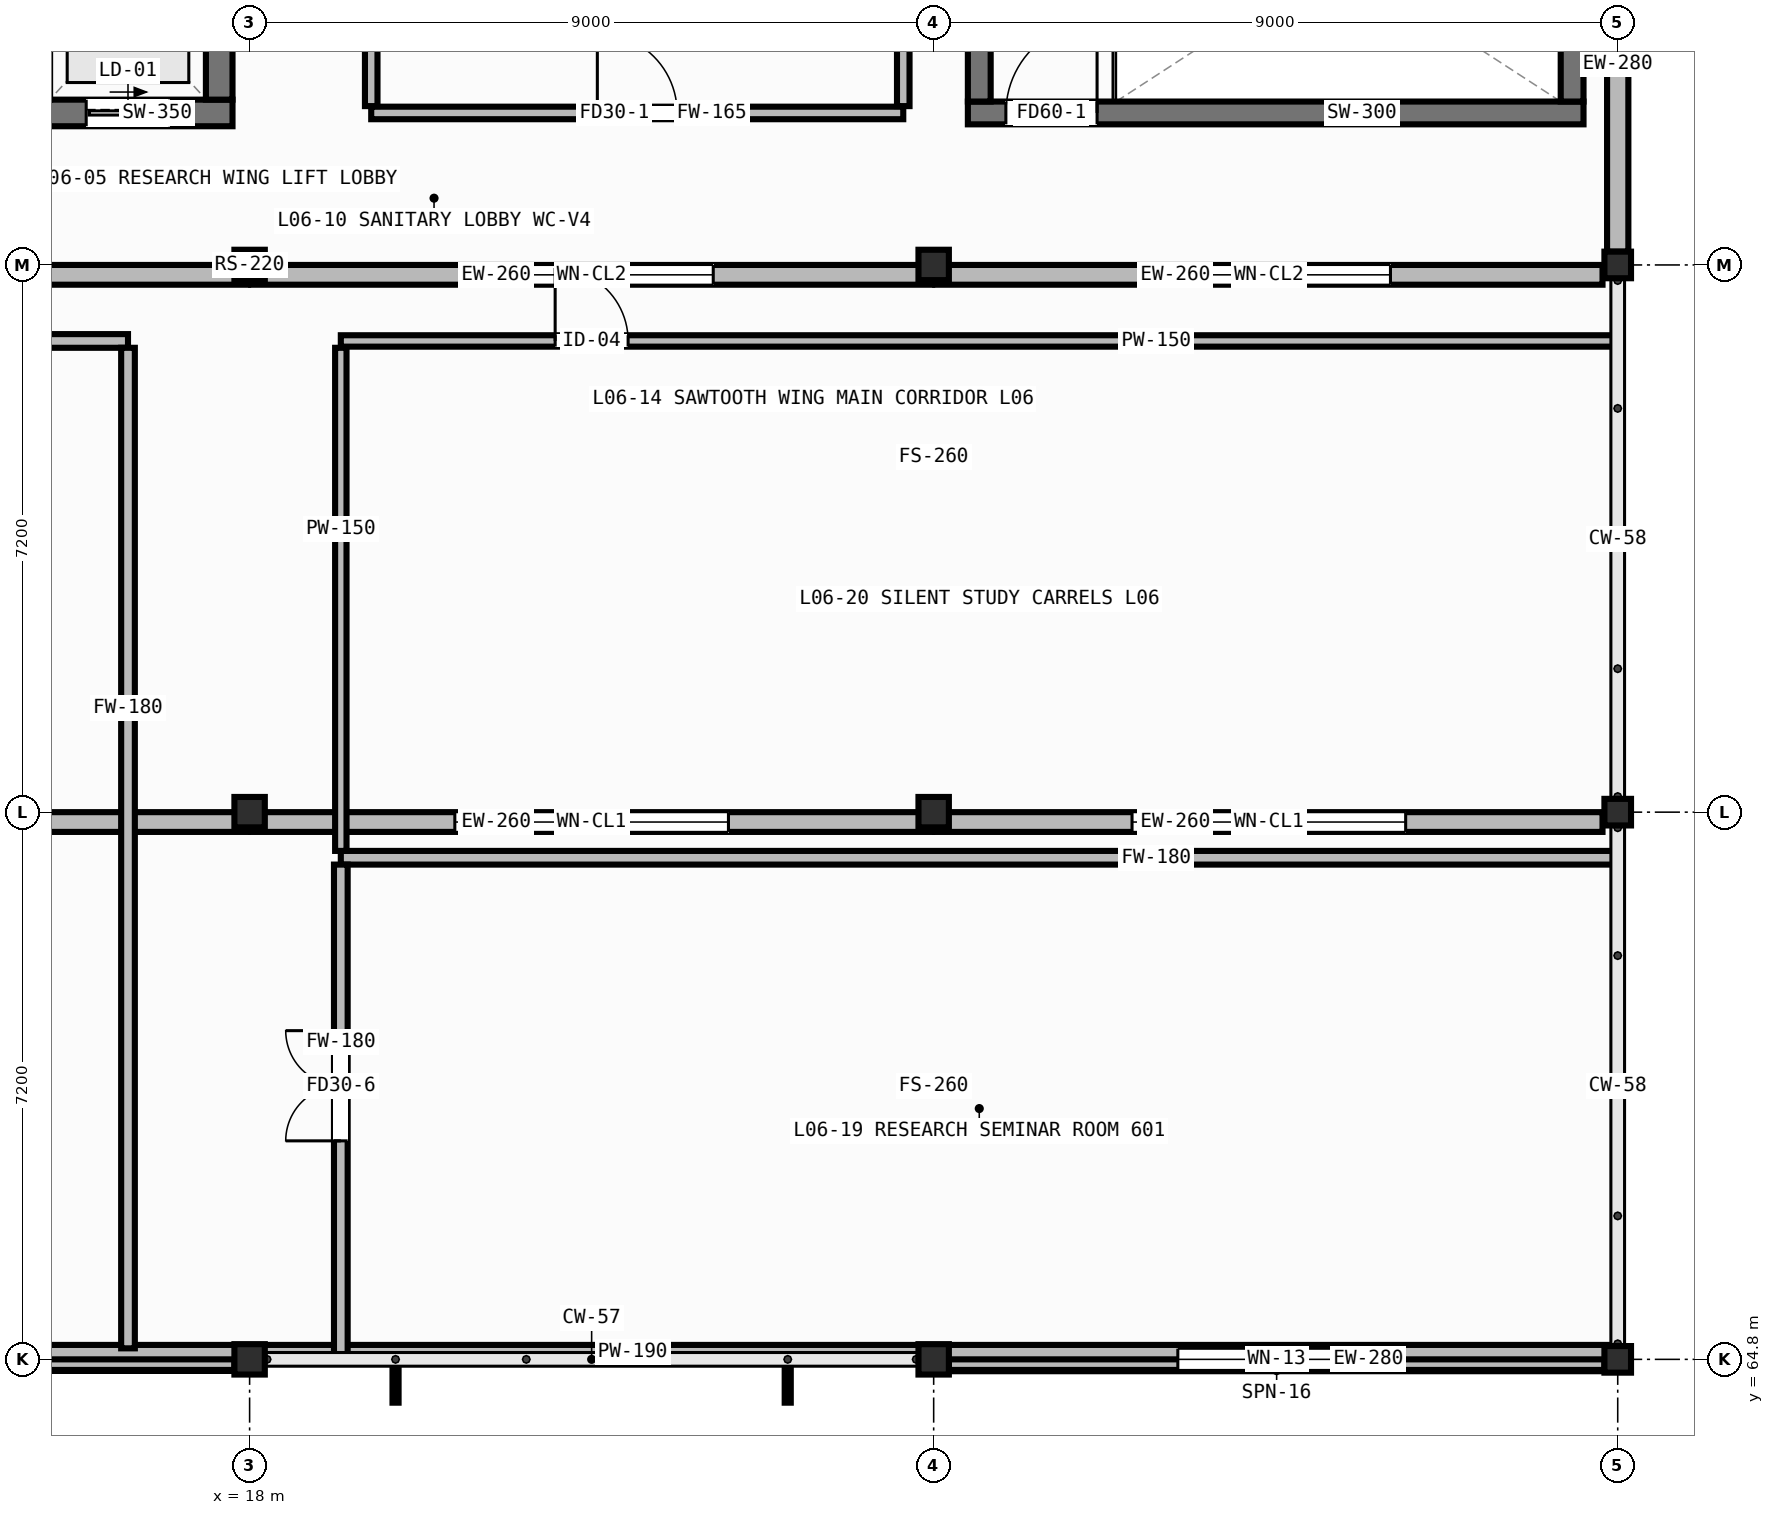
"""IFC4 building model, lengths in metres.
Left out: names, types, materials, properties, quantities, classifications, styles, units other than length and angle.
Written with IfcOpenShell. Run it as: python <this file> out.ifc"""

import sys

from ifc_helpers import new_model, si_unit, direction, frame, frame_2d, origin, origin_2d, place, context, subcontext, project, spatial, rectangle, hollow_rectangle, extrude, element, fill, save


model = new_model("IFC4")
c1 = context("Model", 3, precision=1e-05, world=origin(), true_north=direction((0.0, 1.0)))
c2 = subcontext(c1, "Body", "Model", "MODEL_VIEW")
j1 = project(units=[si_unit("LENGTHUNIT", "METRE"), si_unit("PLANEANGLEUNIT", "RADIAN")], contexts=[c1])
p1 = place(None, origin())
s1 = spatial("IfcSite", under=j1, at=p1, CompositionType="ELEMENT")
p2 = place(p1, origin())
s2 = spatial("IfcBuilding", under=s1, at=p2, CompositionType="ELEMENT")
p3 = place(p2, frame((0.0, 0.0, 20.6)))
s3 = spatial("IfcBuildingStorey", under=s2, at=p3, CompositionType="ELEMENT", Elevation=20.6)
for number, where, z_axis, x_axis in (
    (1, (18.0, 64.8, 0.0), (0.0, 0.0, 1.0), (1.0, 0.0, 0.0)),
    (2, (18.0, 72.0, 0.0), (0.0, 0.0, 1.0), (1.0, 0.0, 0.0)),
    (3, (18.0, 79.2, 0.0), (0.0, 0.0, 1.0), (1.0, 0.0, 0.0)),
    (4, (27.0, 64.8, 0.0), (0.0, 0.0, 1.0), (1.0, 0.0, 0.0)),
    (5, (27.0, 72.0, 0.0), (0.0, 0.0, 1.0), (1.0, 0.0, 0.0)),
    (6, (27.0, 79.2, 0.0), (0.0, 0.0, 1.0), (1.0, 0.0, 0.0)),
):
    element("IfcColumn", number, at=place(p3, frame(where, z_axis=z_axis, x_axis=x_axis)), inside=s3, PredefinedType="COLUMN", context=c2, shape_type="SweptSolid", body=[
        extrude(hollow_rectangle(XDim=0.4, YDim=0.4, WallThickness=0.016, at=origin_2d()), origin(), (0.0, 0.0, 1.0), 3.18),
    ])
for number, where, z_axis, x_axis in (
    (7, (36.0, 64.8, 0.0), (0.0, 0.0, 1.0), (1.0, 0.0, 0.0)),
    (8, (36.0, 72.0, 0.0), (0.0, 0.0, 1.0), (1.0, 0.0, 0.0)),
    (9, (36.0, 79.2, 0.0), (0.0, 0.0, 1.0), (1.0, 0.0, 0.0)),
):
    element("IfcColumn", number, at=place(p3, frame(where, z_axis=z_axis, x_axis=x_axis)), inside=s3, PredefinedType="COLUMN", context=c2, shape_type="SweptSolid", body=[
        extrude(hollow_rectangle(XDim=0.35, YDim=0.35, WallThickness=0.012, at=origin_2d()), origin(), (0.0, 0.0, 1.0), 3.18),
    ])
p4 = place(p3, frame((9.2, 64.8, 0.0), z_axis=(0.0, 0.0, 1.0), x_axis=(1.0, 0.0, 0.0)))
e10 = element("IfcWall", 10, at=p4, inside=s3, PredefinedType="STANDARD", context=c2, shape_type="SweptSolid", body=[
    extrude(rectangle(XDim=8.6, YDim=0.28, at=frame_2d((4.3, 0.0))), origin(), (0.0, 0.0, 1.0), 2.78),
])
p5 = place(p4, frame((3.0, 0.0, 0.85)))
e11 = element("IfcOpeningElement", 11, at=p5, cuts=e10, PredefinedType="OPENING", context=c2, shape_type="SweptSolid", body=[
    extrude(rectangle(XDim=2.6, YDim=1.6, at=frame_2d((1.3, 0.8))), frame((0.0, 0.152, 0.0), z_axis=(0.0, -1.0, 0.0), x_axis=(1.0, 0.0, 0.0)), (0.0, 0.0, 1.0), 0.304),
])
p6 = place(p3, frame((27.2, 64.8, 0.0), z_axis=(0.0, 0.0, 1.0), x_axis=(1.0, 0.0, 0.0)))
e12 = element("IfcWall", 12, at=p6, inside=s3, PredefinedType="STANDARD", context=c2, shape_type="SweptSolid", body=[
    extrude(rectangle(XDim=8.625, YDim=0.28, at=frame_2d((4.312, 0.0))), origin(), (0.0, 0.0, 1.0), 2.78),
])
p7 = place(p6, frame((3.012, 0.0, 0.85)))
e13 = element("IfcOpeningElement", 13, at=p7, cuts=e12, PredefinedType="OPENING", context=c2, shape_type="SweptSolid", body=[
    extrude(rectangle(XDim=2.6, YDim=1.6, at=frame_2d((1.3, 0.8))), frame((0.0, 0.152, 0.0), z_axis=(0.0, -1.0, 0.0), x_axis=(1.0, 0.0, 0.0)), (0.0, 0.0, 1.0), 0.304),
])
p8 = place(p3, frame((36.0, 86.225, 0.0), z_axis=(0.0, 0.0, 1.0), x_axis=(0.0, -1.0, 0.0)))
e14 = element("IfcWall", 14, at=p8, inside=s3, PredefinedType="STANDARD", context=c2, shape_type="SweptSolid", body=[
    extrude(rectangle(XDim=6.85, YDim=0.28, at=frame_2d((3.425, 0.0))), origin(), (0.0, 0.0, 1.0), 2.78),
])
p9 = place(p3, frame((17.98, 71.87, 3.4), z_axis=(0.0, 0.0, 1.0), x_axis=(-1.0, 0.0, 0.0)))
e15 = element("IfcWall", 15, at=p9, inside=s3, PredefinedType="STANDARD", context=c2, shape_type="SweptSolid", body=[
    extrude(rectangle(XDim=8.96, YDim=0.26, at=frame_2d((4.48, 0.0))), origin(), (0.0, 0.0, 1.0), 2.05),
])
p10 = place(p9, frame((2.68, 0.0, 0.38)))
e16 = element("IfcOpeningElement", 16, at=p10, cuts=e15, PredefinedType="OPENING", context=c2, shape_type="SweptSolid", body=[
    extrude(rectangle(XDim=3.6, YDim=1.2, at=frame_2d((1.8, 0.6))), frame((0.0, 0.142, 0.0), z_axis=(0.0, -1.0, 0.0), x_axis=(1.0, 0.0, 0.0)), (0.0, 0.0, 1.0), 0.284),
])
p11 = place(p3, frame((26.98, 71.87, 3.4), z_axis=(0.0, 0.0, 1.0), x_axis=(-1.0, 0.0, 0.0)))
e17 = element("IfcWall", 17, at=p11, inside=s3, PredefinedType="STANDARD", context=c2, shape_type="SweptSolid", body=[
    extrude(rectangle(XDim=8.96, YDim=0.26, at=frame_2d((4.48, 0.0))), origin(), (0.0, 0.0, 1.0), 2.05),
])
p12 = place(p11, frame((2.68, 0.0, 0.38)))
e18 = element("IfcOpeningElement", 18, at=p12, cuts=e17, PredefinedType="OPENING", context=c2, shape_type="SweptSolid", body=[
    extrude(rectangle(XDim=3.6, YDim=1.2, at=frame_2d((1.8, 0.6))), frame((0.0, 0.142, 0.0), z_axis=(0.0, -1.0, 0.0), x_axis=(1.0, 0.0, 0.0)), (0.0, 0.0, 1.0), 0.284),
])
p13 = place(p3, frame((35.8, 71.87, 3.4), z_axis=(0.0, 0.0, 1.0), x_axis=(-1.0, 0.0, 0.0)))
e19 = element("IfcWall", 19, at=p13, inside=s3, PredefinedType="STANDARD", context=c2, shape_type="SweptSolid", body=[
    extrude(rectangle(XDim=8.78, YDim=0.26, at=frame_2d((4.39, 0.0))), origin(), (0.0, 0.0, 1.0), 2.05),
])
p14 = place(p13, frame((2.59, 0.0, 0.38)))
e20 = element("IfcOpeningElement", 20, at=p14, cuts=e19, PredefinedType="OPENING", context=c2, shape_type="SweptSolid", body=[
    extrude(rectangle(XDim=3.6, YDim=1.2, at=frame_2d((1.8, 0.6))), frame((0.0, 0.142, 0.0), z_axis=(0.0, -1.0, 0.0), x_axis=(1.0, 0.0, 0.0)), (0.0, 0.0, 1.0), 0.284),
])
p15 = place(p3, frame((17.98, 79.07, 3.4), z_axis=(0.0, 0.0, 1.0), x_axis=(-1.0, 0.0, 0.0)))
e21 = element("IfcWall", 21, at=p15, inside=s3, PredefinedType="STANDARD", context=c2, shape_type="SweptSolid", body=[
    extrude(rectangle(XDim=8.96, YDim=0.26, at=frame_2d((4.48, 0.0))), origin(), (0.0, 0.0, 1.0), 2.05),
])
p16 = place(p15, frame((2.88, 0.0, 0.38)))
e22 = element("IfcOpeningElement", 22, at=p16, cuts=e21, PredefinedType="OPENING", context=c2, shape_type="SweptSolid", body=[
    extrude(rectangle(XDim=3.2, YDim=1.1, at=frame_2d((1.6, 0.55))), frame((0.0, 0.142, 0.0), z_axis=(0.0, -1.0, 0.0), x_axis=(1.0, 0.0, 0.0)), (0.0, 0.0, 1.0), 0.284),
])
p17 = place(p3, frame((26.98, 79.07, 3.4), z_axis=(0.0, 0.0, 1.0), x_axis=(-1.0, 0.0, 0.0)))
e23 = element("IfcWall", 23, at=p17, inside=s3, PredefinedType="STANDARD", context=c2, shape_type="SweptSolid", body=[
    extrude(rectangle(XDim=8.96, YDim=0.26, at=frame_2d((4.48, 0.0))), origin(), (0.0, 0.0, 1.0), 2.05),
])
p18 = place(p17, frame((2.88, 0.0, 0.38)))
e24 = element("IfcOpeningElement", 24, at=p18, cuts=e23, PredefinedType="OPENING", context=c2, shape_type="SweptSolid", body=[
    extrude(rectangle(XDim=3.2, YDim=1.1, at=frame_2d((1.6, 0.55))), frame((0.0, 0.142, 0.0), z_axis=(0.0, -1.0, 0.0), x_axis=(1.0, 0.0, 0.0)), (0.0, 0.0, 1.0), 0.284),
])
p19 = place(p3, frame((35.8, 79.07, 3.4), z_axis=(0.0, 0.0, 1.0), x_axis=(-1.0, 0.0, 0.0)))
e25 = element("IfcWall", 25, at=p19, inside=s3, PredefinedType="STANDARD", context=c2, shape_type="SweptSolid", body=[
    extrude(rectangle(XDim=8.78, YDim=0.26, at=frame_2d((4.39, 0.0))), origin(), (0.0, 0.0, 1.0), 2.05),
])
p20 = place(p19, frame((2.79, 0.0, 0.38)))
e26 = element("IfcOpeningElement", 26, at=p20, cuts=e25, PredefinedType="OPENING", context=c2, shape_type="SweptSolid", body=[
    extrude(rectangle(XDim=3.2, YDim=1.1, at=frame_2d((1.6, 0.55))), frame((0.0, 0.142, 0.0), z_axis=(0.0, -1.0, 0.0), x_axis=(1.0, 0.0, 0.0)), (0.0, 0.0, 1.0), 0.284),
])
p21 = place(p3, frame((0.0, 64.895, 3.4), z_axis=(0.0, 0.0, 1.0), x_axis=(1.0, 0.0, 0.0)))
e27 = element("IfcWall", 27, at=p21, inside=s3, PredefinedType="PARAPET", context=c2, shape_type="SweptSolid", body=[
    extrude(rectangle(XDim=36.0, YDim=0.19, at=frame_2d((18.0, 0.0))), origin(), (0.0, 0.0, 1.0), 0.75),
])
p22 = place(p3, frame((27.45, 81.2, 0.0), z_axis=(0.0, 0.0, 1.0), x_axis=(1.0, 0.0, 0.0)))
e28 = element("IfcWall", 28, at=p22, inside=s3, PredefinedType="SHEAR", context=c2, shape_type="SweptSolid", body=[
    extrude(rectangle(XDim=8.1, YDim=0.3, at=frame_2d((4.05, 0.0))), origin(), (0.0, 0.0, 1.0), 3.18),
])
p23 = place(p22, frame((0.5, 0.0, 0.0)))
e29 = element("IfcOpeningElement", 29, at=p23, cuts=e28, PredefinedType="OPENING", context=c2, shape_type="SweptSolid", body=[
    extrude(rectangle(XDim=1.2, YDim=2.1, at=frame_2d((0.6, 1.05))), frame((0.0, 0.162, 0.0), z_axis=(0.0, -1.0, 0.0), x_axis=(1.0, 0.0, 0.0)), (0.0, 0.0, 1.0), 0.324),
])
for number, where, z_axis, x_axis in (
    (30, (27.6, 81.35, 0.0), (0.0, 0.0, 1.0), (0.0, 1.0, 0.0)),
    (31, (35.4, 81.35, 0.0), (0.0, 0.0, 1.0), (0.0, 1.0, 0.0)),
):
    element("IfcWall", number, at=place(p3, frame(where, z_axis=z_axis, x_axis=x_axis)), inside=s3, PredefinedType="SHEAR", context=c2, shape_type="SweptSolid", body=[
        extrude(rectangle(XDim=3.8, YDim=0.3, at=frame_2d((1.9, 0.0))), origin(), (0.0, 0.0, 1.0), 3.18),
    ])
p24 = place(p3, frame((15.025, 81.2, 0.0), z_axis=(0.0, 0.0, 1.0), x_axis=(1.0, 0.0, 0.0)))
e32 = element("IfcWall", 32, at=p24, inside=s3, PredefinedType="SHEAR", context=c2, shape_type="SweptSolid", body=[
    extrude(rectangle(XDim=2.75, YDim=0.35, at=frame_2d((1.375, 0.0))), origin(), (0.0, 0.0, 1.0), 3.18),
])
p25 = place(p24, frame((0.825, 0.0, 0.0)))
e33 = element("IfcOpeningElement", 33, at=p25, cuts=e32, PredefinedType="OPENING", context=c2, shape_type="SweptSolid", body=[
    extrude(rectangle(XDim=1.1, YDim=2.1, at=frame_2d((0.55, 1.05))), frame((0.0, 0.187, 0.0), z_axis=(0.0, -1.0, 0.0), x_axis=(1.0, 0.0, 0.0)), (0.0, 0.0, 1.0), 0.374),
])
p26 = place(p3, frame((17.6, 81.375, 0.0), z_axis=(0.0, 0.0, 1.0), x_axis=(0.0, 1.0, 0.0)))
e34 = element("IfcWall", 34, at=p26, inside=s3, PredefinedType="SHEAR", context=c2, shape_type="SweptSolid", body=[
    extrude(rectangle(XDim=2.25, YDim=0.35, at=frame_2d((1.125, 0.0))), origin(), (0.0, 0.0, 1.0), 3.18),
])
p27 = place(p3, frame((19.6, 81.2, 0.0), z_axis=(0.0, 0.0, 1.0), x_axis=(1.0, 0.0, 0.0)))
e35 = element("IfcWall", 35, at=p27, inside=s3, PredefinedType="PARTITIONING", context=c2, shape_type="SweptSolid", body=[
    extrude(rectangle(XDim=7.0, YDim=0.165, at=frame_2d((3.5, 0.0))), origin(), (0.0, 0.0, 1.0), 3.18),
])
p28 = place(p27, frame((2.975, 0.0, 0.0)))
e36 = element("IfcOpeningElement", 36, at=p28, cuts=e35, PredefinedType="OPENING", context=c2, shape_type="SweptSolid", body=[
    extrude(rectangle(XDim=1.05, YDim=2.1, at=frame_2d((0.525, 1.05))), frame((0.0, 0.094, 0.0), z_axis=(0.0, -1.0, 0.0), x_axis=(1.0, 0.0, 0.0)), (0.0, 0.0, 1.0), 0.189),
])
for number, where, z_axis, x_axis in (
    (37, (19.6, 81.29, 0.0), (0.0, 0.0, 1.0), (0.0, 1.0, 0.0)),
    (38, (26.6, 81.29, 0.0), (0.0, 0.0, 1.0), (0.0, 1.0, 0.0)),
):
    element("IfcWall", number, at=place(p3, frame(where, z_axis=z_axis, x_axis=x_axis)), inside=s3, PredefinedType="PARTITIONING", context=c2, shape_type="SweptSolid", body=[
        extrude(rectangle(XDim=2.22, YDim=0.165, at=frame_2d((1.11, 0.0))), origin(), (0.0, 0.0, 1.0), 3.18),
    ])
p29 = place(p3, frame((0.035, 78.2, 0.0), z_axis=(0.0, 0.0, 1.0), x_axis=(1.0, 0.0, 0.0)))
e39 = element("IfcWall", 39, at=p29, inside=s3, PredefinedType="PARTITIONING", context=c2, shape_type="SweptSolid", body=[
    extrude(rectangle(XDim=16.365, YDim=0.18, at=frame_2d((8.183, 0.0))), origin(), (0.0, 0.0, 1.0), 3.18),
])
p30 = place(p29, frame((3.815, 0.0, 0.0)))
e40 = element("IfcOpeningElement", 40, at=p30, cuts=e39, PredefinedType="OPENING", context=c2, shape_type="SweptSolid", body=[
    extrude(rectangle(XDim=1.3, YDim=2.08, at=frame_2d((0.65, 1.04))), frame((0.0, 0.102, 0.0), z_axis=(0.0, -1.0, 0.0), x_axis=(1.0, 0.0, 0.0)), (0.0, 0.0, 1.0), 0.204),
])
p31 = place(p3, frame((16.4, 64.945, 0.0), z_axis=(0.0, 0.0, 1.0), x_axis=(0.0, 1.0, 0.0)))
e41 = element("IfcWall", 41, at=p31, inside=s3, PredefinedType="PARTITIONING", context=c2, shape_type="SweptSolid", body=[
    extrude(rectangle(XDim=13.165, YDim=0.18, at=frame_2d((6.583, 0.0))), origin(), (0.0, 0.0, 1.0), 3.18),
])
p32 = place(p3, frame((19.2, 71.4, 0.0), z_axis=(0.0, 0.0, 1.0), x_axis=(1.0, 0.0, 0.0)))
e42 = element("IfcWall", 42, at=p32, inside=s3, PredefinedType="PARTITIONING", context=c2, shape_type="SweptSolid", body=[
    extrude(rectangle(XDim=16.765, YDim=0.18, at=frame_2d((8.383, 0.0))), origin(), (0.0, 0.0, 1.0), 3.18),
])
p33 = place(p3, frame((19.2, 64.835, 0.0), z_axis=(0.0, 0.0, 1.0), x_axis=(0.0, 1.0, 0.0)))
e43 = element("IfcWall", 43, at=p33, inside=s3, PredefinedType="PARTITIONING", context=c2, shape_type="SweptSolid", body=[
    extrude(rectangle(XDim=6.475, YDim=0.18, at=frame_2d((3.238, 0.0))), origin(), (0.0, 0.0, 1.0), 3.18),
])
p34 = place(p33, frame((2.84, 0.0, 0.0)))
e44 = element("IfcOpeningElement", 44, at=p34, cuts=e43, PredefinedType="OPENING", context=c2, shape_type="SweptSolid", body=[
    extrude(rectangle(XDim=1.45, YDim=2.1, at=frame_2d((0.725, 1.05))), frame((0.0, 0.102, 0.0), z_axis=(0.0, -1.0, 0.0), x_axis=(1.0, 0.0, 0.0)), (0.0, 0.0, 1.0), 0.204),
])
p35 = place(p3, frame((19.2, 78.2, 0.0), z_axis=(0.0, 0.0, 1.0), x_axis=(1.0, 0.0, 0.0)))
e45 = element("IfcWall", 45, at=p35, inside=s3, PredefinedType="PARTITIONING", context=c2, shape_type="SweptSolid", body=[
    extrude(rectangle(XDim=16.765, YDim=0.15, at=frame_2d((8.383, 0.0))), origin(), (0.0, 0.0, 1.0), 3.18),
])
p36 = place(p35, frame((2.82, 0.0, 0.0)))
e46 = element("IfcOpeningElement", 46, at=p36, cuts=e45, PredefinedType="OPENING", context=c2, shape_type="SweptSolid", body=[
    extrude(rectangle(XDim=0.96, YDim=2.1, at=frame_2d((0.48, 1.05))), frame((0.0, 0.087, 0.0), z_axis=(0.0, -1.0, 0.0), x_axis=(1.0, 0.0, 0.0)), (0.0, 0.0, 1.0), 0.174),
])
p37 = place(p3, frame((19.2, 71.49, 0.0), z_axis=(0.0, 0.0, 1.0), x_axis=(0.0, 1.0, 0.0)))
e47 = element("IfcWall", 47, at=p37, inside=s3, PredefinedType="PARTITIONING", context=c2, shape_type="SweptSolid", body=[
    extrude(rectangle(XDim=6.62, YDim=0.15, at=frame_2d((3.31, 0.0))), origin(), (0.0, 0.0, 1.0), 3.18),
])
p38 = place(p7, origin())
e48 = element("IfcWindow", 48, at=p38, inside=s3, PartitioningType="DOUBLE_PANEL_VERTICAL", PredefinedType="WINDOW", context=c2, shape_type="SweptSolid", body=[
    extrude(rectangle(XDim=2.6, YDim=1.6, at=frame_2d((1.3, 0.8))), frame((0.0, 0.03, 0.0), z_axis=(0.0, -1.0, 0.0), x_axis=(1.0, 0.0, 0.0)), (0.0, 0.0, 1.0), 0.06),
])
fill(e13, e48)
p39 = place(p12, origin())
e49 = element("IfcWindow", 49, at=p39, inside=s3, PartitioningType="DOUBLE_PANEL_VERTICAL", PredefinedType="WINDOW", context=c2, shape_type="SweptSolid", body=[
    extrude(rectangle(XDim=3.6, YDim=1.2, at=frame_2d((1.8, 0.6))), frame((0.0, 0.03, 0.0), z_axis=(0.0, -1.0, 0.0), x_axis=(1.0, 0.0, 0.0)), (0.0, 0.0, 1.0), 0.06),
])
fill(e18, e49)
p40 = place(p14, origin())
e50 = element("IfcWindow", 50, at=p40, inside=s3, PartitioningType="DOUBLE_PANEL_VERTICAL", PredefinedType="WINDOW", context=c2, shape_type="SweptSolid", body=[
    extrude(rectangle(XDim=3.6, YDim=1.2, at=frame_2d((1.8, 0.6))), frame((0.0, 0.03, 0.0), z_axis=(0.0, -1.0, 0.0), x_axis=(1.0, 0.0, 0.0)), (0.0, 0.0, 1.0), 0.06),
])
fill(e20, e50)
p41 = place(p18, origin())
e51 = element("IfcWindow", 51, at=p41, inside=s3, PartitioningType="DOUBLE_PANEL_VERTICAL", PredefinedType="WINDOW", context=c2, shape_type="SweptSolid", body=[
    extrude(rectangle(XDim=3.2, YDim=1.1, at=frame_2d((1.6, 0.55))), frame((0.0, 0.03, 0.0), z_axis=(0.0, -1.0, 0.0), x_axis=(1.0, 0.0, 0.0)), (0.0, 0.0, 1.0), 0.06),
])
fill(e24, e51)
p42 = place(p20, origin())
e52 = element("IfcWindow", 52, at=p42, inside=s3, PartitioningType="DOUBLE_PANEL_VERTICAL", PredefinedType="WINDOW", context=c2, shape_type="SweptSolid", body=[
    extrude(rectangle(XDim=3.2, YDim=1.1, at=frame_2d((1.6, 0.55))), frame((0.0, 0.03, 0.0), z_axis=(0.0, -1.0, 0.0), x_axis=(1.0, 0.0, 0.0)), (0.0, 0.0, 1.0), 0.06),
])
fill(e26, e52)
p43 = place(p23, origin())
e53 = element("IfcDoor", 53, at=p43, inside=s3, OperationType="SINGLE_SWING_RIGHT", PredefinedType="DOOR", context=c2, shape_type="SweptSolid", body=[
    extrude(rectangle(XDim=1.2, YDim=2.1, at=frame_2d((0.6, 1.05))), frame((0.0, 0.025, 0.0), z_axis=(0.0, -1.0, 0.0), x_axis=(1.0, 0.0, 0.0)), (0.0, 0.0, 1.0), 0.05),
])
fill(e29, e53)
p44 = place(p25, origin())
e54 = element("IfcDoor", 54, at=p44, inside=s3, OperationType="SLIDING_TO_LEFT", PredefinedType="DOOR", context=c2, shape_type="SweptSolid", body=[
    extrude(rectangle(XDim=1.1, YDim=2.1, at=frame_2d((0.55, 1.05))), frame((0.0, 0.025, 0.0), z_axis=(0.0, -1.0, 0.0), x_axis=(1.0, 0.0, 0.0)), (0.0, 0.0, 1.0), 0.05),
])
fill(e33, e54)
p45 = place(p28, origin())
e55 = element("IfcDoor", 55, at=p45, inside=s3, OperationType="SINGLE_SWING_LEFT", PredefinedType="DOOR", context=c2, shape_type="SweptSolid", body=[
    extrude(rectangle(XDim=1.05, YDim=2.1, at=frame_2d((0.525, 1.05))), frame((0.0, 0.025, 0.0), z_axis=(0.0, -1.0, 0.0), x_axis=(1.0, 0.0, 0.0)), (0.0, 0.0, 1.0), 0.05),
])
fill(e36, e55)
p46 = place(p34, origin())
e56 = element("IfcDoor", 56, at=p46, inside=s3, OperationType="DOUBLE_DOOR_SINGLE_SWING", PredefinedType="DOOR", context=c2, shape_type="SweptSolid", body=[
    extrude(rectangle(XDim=1.45, YDim=2.1, at=frame_2d((0.725, 1.05))), frame((0.0, 0.025, 0.0), z_axis=(0.0, -1.0, 0.0), x_axis=(1.0, 0.0, 0.0)), (0.0, 0.0, 1.0), 0.05),
])
fill(e44, e56)
p47 = place(p36, origin())
e57 = element("IfcDoor", 57, at=p47, inside=s3, OperationType="SINGLE_SWING_LEFT", PredefinedType="DOOR", context=c2, shape_type="SweptSolid", body=[
    extrude(rectangle(XDim=0.96, YDim=2.1, at=frame_2d((0.48, 1.05))), frame((0.0, 0.025, 0.0), z_axis=(0.0, -1.0, 0.0), x_axis=(1.0, 0.0, 0.0)), (0.0, 0.0, 1.0), 0.05),
])
fill(e46, e57)
save(model, sys.argv[1])
